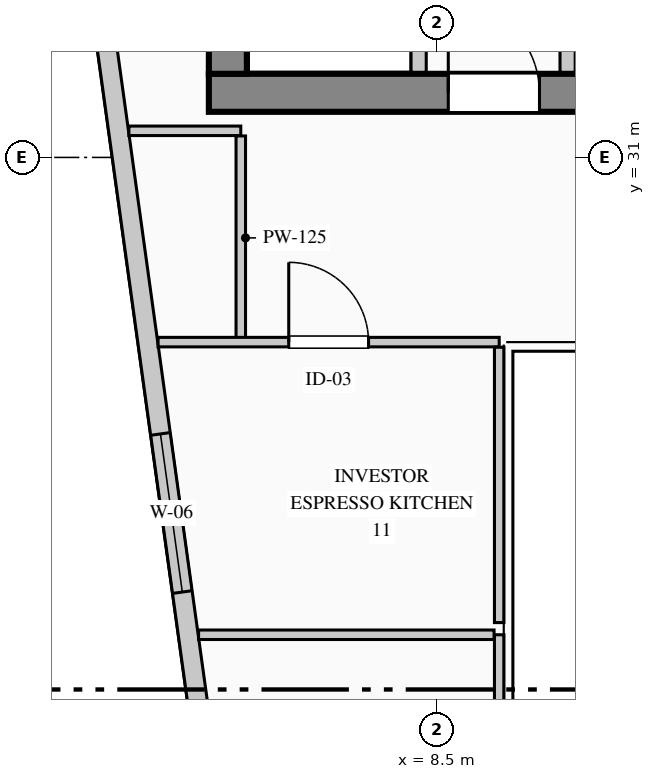
"""IFC4 building model, lengths in metres.
Left out: names, types, materials, properties, quantities, classifications, styles, units other than length and angle.
Written with IfcOpenShell. Run it as: python <this file> out.ifc"""

import sys

from ifc_helpers import new_model, si_unit, direction, frame, frame_2d, origin, place, context, subcontext, project, spatial, rectangle, extrude, element, fill, save


model = new_model("IFC4")
c1 = context("Model", 3, precision=1e-05, world=origin(), true_north=direction((0.0, 1.0)))
c2 = subcontext(c1, "Body", "Model", "MODEL_VIEW")
j1 = project(units=[si_unit("LENGTHUNIT", "METRE"), si_unit("PLANEANGLEUNIT", "RADIAN")], contexts=[c1])
p1 = place(None, origin())
s1 = spatial("IfcSite", under=j1, at=p1, CompositionType="ELEMENT")
p2 = place(p1, origin())
s2 = spatial("IfcBuilding", under=s1, at=p2, CompositionType="ELEMENT")
p3 = place(p2, frame((0.0, 0.0, 158.8)))
s3 = spatial("IfcBuildingStorey", under=s2, at=p3, CompositionType="ELEMENT", Elevation=158.8)
p4 = place(p3, frame((5.5, 31.85, 0.0), z_axis=(0.0, 0.0, 1.0), x_axis=(1.0, 0.0, 0.0)))
e1 = element("IfcWall", 1, at=p4, inside=s3, PredefinedType="SHEAR", context=c2, shape_type="SweptSolid", body=[
    extrude(rectangle(XDim=17.85, YDim=0.5, at=frame_2d((8.925, 0.0))), origin(), (0.0, 0.0, 1.0), 3.95),
])
p5 = place(p4, frame((3.15, 0.0, 0.0)))
e2 = element("IfcOpeningElement", 2, at=p5, cuts=e1, PredefinedType="OPENING", context=c2, shape_type="SweptSolid", body=[
    extrude(rectangle(XDim=1.2, YDim=2.2, at=frame_2d((0.6, 1.1))), frame((0.0, 0.26, 0.0), z_axis=(0.0, -1.0, 0.0), x_axis=(1.0, 0.0, 0.0)), (0.0, 0.0, 1.0), 0.52),
])
p6 = place(p4, frame((7.0, 0.0, 0.0)))
e3 = element("IfcOpeningElement", 3, at=p6, cuts=e1, PredefinedType="OPENING", context=c2, shape_type="SweptSolid", body=[
    extrude(rectangle(XDim=1.2, YDim=2.2, at=frame_2d((0.6, 1.1))), frame((0.0, 0.26, 0.0), z_axis=(0.0, -1.0, 0.0), x_axis=(1.0, 0.0, 0.0)), (0.0, 0.0, 1.0), 0.52),
])
p7 = place(p4, frame((8.85, 0.0, 0.0)))
e4 = element("IfcOpeningElement", 4, at=p7, cuts=e1, PredefinedType="OPENING", context=c2, shape_type="SweptSolid", body=[
    extrude(rectangle(XDim=1.15, YDim=2.2, at=frame_2d((0.575, 1.1))), frame((0.0, 0.26, 0.0), z_axis=(0.0, -1.0, 0.0), x_axis=(1.0, 0.0, 0.0)), (0.0, 0.0, 1.0), 0.52),
])
p8 = place(p4, frame((15.95, 0.0, 0.0)))
e5 = element("IfcOpeningElement", 5, at=p8, cuts=e1, PredefinedType="OPENING", context=c2, shape_type="SweptSolid", body=[
    extrude(rectangle(XDim=1.2, YDim=2.2, at=frame_2d((0.6, 1.1))), frame((0.0, 0.26, 0.0), z_axis=(0.0, -1.0, 0.0), x_axis=(1.0, 0.0, 0.0)), (0.0, 0.0, 1.0), 0.52),
])
p9 = place(p3, frame((5.75, 32.1, 0.0), z_axis=(0.0, 0.0, 1.0), x_axis=(0.0, 1.0, 0.0)))
e6 = element("IfcWall", 6, at=p9, inside=s3, PredefinedType="SHEAR", context=c2, shape_type="SweptSolid", body=[
    extrude(rectangle(XDim=8.3, YDim=0.5, at=frame_2d((4.15, 0.0))), origin(), (0.0, 0.0, 1.0), 3.95),
])
p10 = place(p3, frame((7.993, 4.73, 0.0), z_axis=(0.0, 0.0, 1.0), x_axis=(-0.136989009016, 0.990572567462, 0.0)))
e7 = element("IfcWall", 7, at=p10, inside=s3, PredefinedType="STANDARD", context=c2, shape_type="SweptSolid", body=[
    extrude(rectangle(XDim=36.888, YDim=0.26, at=frame_2d((18.444, 0.0))), origin(), (0.0, 0.0, 1.0), 3.69),
])
p11 = place(p10, frame((20.748, 0.0, 0.9)))
e8 = element("IfcOpeningElement", 8, at=p11, cuts=e7, PredefinedType="OPENING", context=c2, shape_type="SweptSolid", body=[
    extrude(rectangle(XDim=2.1, YDim=2.0, at=frame_2d((1.05, 1.0))), frame((0.0, 0.14, 0.0), z_axis=(0.0, -1.0, 0.0), x_axis=(1.0, 0.0, 0.0)), (0.0, 0.0, 1.0), 0.28),
])
p12 = place(p3, frame((8.26, 32.12, 0.0), z_axis=(0.0, 0.0, 1.0), x_axis=(0.0, 1.0, 0.0)))
e9 = element("IfcWall", 9, at=p12, inside=s3, PredefinedType="PARTITIONING", context=c2, shape_type="SweptSolid", body=[
    extrude(rectangle(XDim=7.5, YDim=0.2, at=frame_2d((3.75, 0.0))), origin(), (0.0, 0.0, 1.0), 3.69),
])
p13 = place(p3, frame((10.22, 32.12, 0.0), z_axis=(0.0, 0.0, 1.0), x_axis=(0.0, 1.0, 0.0)))
e10 = element("IfcWall", 10, at=p13, inside=s3, PredefinedType="PARTITIONING", context=c2, shape_type="SweptSolid", body=[
    extrude(rectangle(XDim=8.26, YDim=0.2, at=frame_2d((4.13, 0.0))), origin(), (0.0, 0.0, 1.0), 3.69),
])
p14 = place(p3, frame((9.32, 24.72, 0.0), z_axis=(0.0, 0.0, 1.0), x_axis=(0.0, -1.0, 0.0)))
e11 = element("IfcWall", 11, at=p14, inside=s3, PredefinedType="PARTITIONING", context=c2, shape_type="SweptSolid", body=[
    extrude(rectangle(XDim=4.97, YDim=0.125, at=frame_2d((2.485, 0.0))), origin(), (0.0, 0.0, 1.0), 3.375),
])
p15 = place(p3, frame((5.365, 24.72, 0.0), z_axis=(0.0, 0.0, 1.0), x_axis=(1.0, 0.0, 0.0)))
e12 = element("IfcWall", 12, at=p15, inside=s3, PredefinedType="PARTITIONING", context=c2, shape_type="SweptSolid", body=[
    extrude(rectangle(XDim=3.888, YDim=0.125, at=frame_2d((1.944, 0.0))), origin(), (0.0, 0.0, 1.0), 3.69),
])
p16 = place(p3, frame((4.448, 31.35, 0.0), z_axis=(0.0, 0.0, 1.0), x_axis=(1.0, 0.0, 0.0)))
e13 = element("IfcWall", 13, at=p16, inside=s3, PredefinedType="PARTITIONING", context=c2, shape_type="SweptSolid", body=[
    extrude(rectangle(XDim=1.472, YDim=0.125, at=frame_2d((0.736, 0.0))), origin(), (0.0, 0.0, 1.0), 3.69),
])
p17 = place(p3, frame((5.92, 31.282, 0.0), z_axis=(0.0, 0.0, 1.0), x_axis=(0.0, -1.0, 0.0)))
e14 = element("IfcWall", 14, at=p17, inside=s3, PredefinedType="PARTITIONING", context=c2, shape_type="SweptSolid", body=[
    extrude(rectangle(XDim=2.682, YDim=0.125, at=frame_2d((1.341, 0.0))), origin(), (0.0, 0.0, 1.0), 3.69),
])
p18 = place(p3, frame((4.832, 28.57, 0.0), z_axis=(0.0, 0.0, 1.0), x_axis=(1.0, 0.0, 0.0)))
e15 = element("IfcWall", 15, at=p18, inside=s3, PredefinedType="PARTITIONING", context=c2, shape_type="SweptSolid", body=[
    extrude(rectangle(XDim=4.488, YDim=0.125, at=frame_2d((2.244, 0.0))), origin(), (0.0, 0.0, 1.0), 3.69),
])
p19 = place(p18, frame((1.719, 0.0, 0.0)))
e16 = element("IfcOpeningElement", 16, at=p19, cuts=e15, PredefinedType="OPENING", context=c2, shape_type="SweptSolid", body=[
    extrude(rectangle(XDim=1.05, YDim=2.15, at=frame_2d((0.525, 1.075))), frame((0.0, 0.073, 0.0), z_axis=(0.0, -1.0, 0.0), x_axis=(1.0, 0.0, 0.0)), (0.0, 0.0, 1.0), 0.145),
])
p20 = place(p3, frame((9.32, 28.502, 0.0), z_axis=(0.0, 0.0, 1.0), x_axis=(0.0, -1.0, 0.0)))
e17 = element("IfcWall", 17, at=p20, inside=s3, PredefinedType="PARTITIONING", context=c2, shape_type="SweptSolid", body=[
    extrude(rectangle(XDim=3.623, YDim=0.125, at=frame_2d((1.811, 0.0))), origin(), (0.0, 0.0, 1.0), 3.375),
])
p21 = place(p11, origin())
e18 = element("IfcWindow", 18, at=p21, inside=s3, PartitioningType="DOUBLE_PANEL_VERTICAL", PredefinedType="WINDOW", context=c2, shape_type="SweptSolid", body=[
    extrude(rectangle(XDim=2.1, YDim=2.0, at=frame_2d((1.05, 1.0))), frame((0.0, 0.03, 0.0), z_axis=(0.0, -1.0, 0.0), x_axis=(1.0, 0.0, 0.0)), (0.0, 0.0, 1.0), 0.06),
])
fill(e8, e18)
p22 = place(p5, origin())
e19 = element("IfcDoor", 19, at=p22, inside=s3, OperationType="SINGLE_SWING_LEFT", PredefinedType="DOOR", context=c2, shape_type="SweptSolid", body=[
    extrude(rectangle(XDim=1.2, YDim=2.2, at=frame_2d((0.6, 1.1))), frame((0.0, 0.025, 0.0), z_axis=(0.0, -1.0, 0.0), x_axis=(1.0, 0.0, 0.0)), (0.0, 0.0, 1.0), 0.05),
])
fill(e2, e19)
p23 = place(p19, origin())
e20 = element("IfcDoor", 20, at=p23, inside=s3, OperationType="SINGLE_SWING_LEFT", PredefinedType="DOOR", context=c2, shape_type="SweptSolid", body=[
    extrude(rectangle(XDim=1.05, YDim=2.15, at=frame_2d((0.525, 1.075))), frame((0.0, 0.025, 0.0), z_axis=(0.0, -1.0, 0.0), x_axis=(1.0, 0.0, 0.0)), (0.0, 0.0, 1.0), 0.05),
])
fill(e16, e20)
save(model, sys.argv[1])
